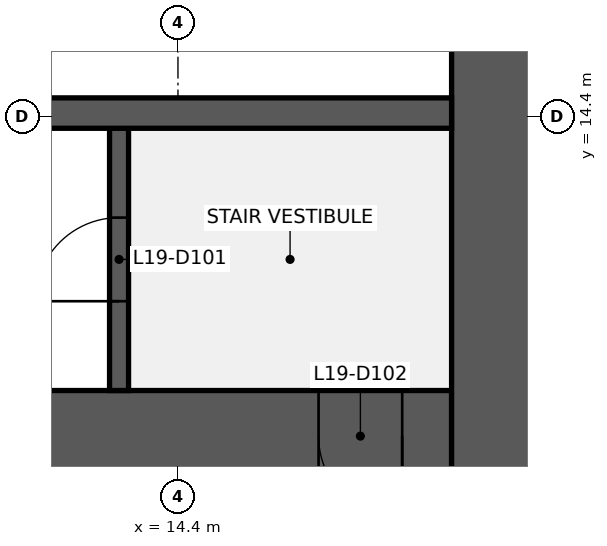
"""IFC4 building model, lengths in metres.
Left out: names, types, materials, properties, quantities, classifications, styles, units other than length and angle.
Written with IfcOpenShell. Run it as: python <this file> out.ifc"""

import sys

from ifc_helpers import new_model, si_unit, direction, frame, frame_2d, origin, place, context, subcontext, project, spatial, rectangle, extrude, element, fill, save


model = new_model("IFC4")
c1 = context("Model", 3, precision=1e-05, world=origin(), true_north=direction((0.0, 1.0)))
c2 = subcontext(c1, "Body", "Model", "MODEL_VIEW")
j1 = project(units=[si_unit("LENGTHUNIT", "METRE"), si_unit("PLANEANGLEUNIT", "RADIAN")], contexts=[c1])
p1 = place(None, origin())
s1 = spatial("IfcSite", under=j1, at=p1, CompositionType="ELEMENT")
p2 = place(p1, origin())
s2 = spatial("IfcBuilding", under=s1, at=p2, CompositionType="ELEMENT")
p3 = place(p2, frame((0.0, 0.0, 87.0)))
s3 = spatial("IfcBuildingStorey", under=s2, at=p3, CompositionType="ELEMENT", Elevation=87.0)
p4 = place(p3, frame((18.0, 10.2, 0.0), z_axis=(0.0, 0.0, 1.0), x_axis=(-1.0, 0.0, 0.0)))
e1 = element("IfcWall", 1, at=p4, inside=s3, PredefinedType="SHEAR", context=c2, shape_type="SweptSolid", body=[
    extrude(rectangle(XDim=8.4, YDim=1.2, at=frame_2d((4.2, 0.0))), origin(), (0.0, 0.0, 1.0), 4.1),
])
p5 = place(p4, frame((0.65, 0.0, 0.0)))
e2 = element("IfcOpeningElement", 2, at=p5, cuts=e1, PredefinedType="OPENING", context=c2, shape_type="SweptSolid", body=[
    extrude(rectangle(XDim=1.1, YDim=2.1, at=frame_2d((0.55, 1.05))), frame((0.0, 0.61, 0.0), z_axis=(0.0, -1.0, 0.0), x_axis=(1.0, 0.0, 0.0)), (0.0, 0.0, 1.0), 1.22),
])
p6 = place(p3, frame((18.6, 38.4, 0.0), z_axis=(0.0, 0.0, 1.0), x_axis=(0.0, -1.0, 0.0)))
e3 = element("IfcWall", 3, at=p6, inside=s3, PredefinedType="SHEAR", context=c2, shape_type="SweptSolid", body=[
    extrude(rectangle(XDim=28.8, YDim=1.2, at=frame_2d((14.4, 0.0))), origin(), (0.0, 0.0, 1.0), 4.1),
])
p7 = place(p6, frame((18.3, 0.0, 0.0)))
e4 = element("IfcOpeningElement", 4, at=p7, cuts=e3, PredefinedType="OPENING", context=c2, shape_type="SweptSolid", body=[
    extrude(rectangle(XDim=1.8, YDim=2.1, at=frame_2d((0.9, 1.05))), frame((0.0, 0.61, 0.0), z_axis=(0.0, -1.0, 0.0), x_axis=(1.0, 0.0, 0.0)), (0.0, 0.0, 1.0), 1.22),
])
p8 = place(p6, frame((8.7, 0.0, 0.0)))
e5 = element("IfcOpeningElement", 5, at=p8, cuts=e3, PredefinedType="OPENING", context=c2, shape_type="SweptSolid", body=[
    extrude(rectangle(XDim=1.8, YDim=2.1, at=frame_2d((0.9, 1.05))), frame((0.0, 0.61, 0.0), z_axis=(0.0, -1.0, 0.0), x_axis=(1.0, 0.0, 0.0)), (0.0, 0.0, 1.0), 1.22),
])
p9 = place(p3, frame((13.625, 10.8, 0.0), z_axis=(0.0, 0.0, 1.0), x_axis=(0.0, 1.0, 0.0)))
e6 = element("IfcWall", 6, at=p9, inside=s3, PredefinedType="SHEAR", context=c2, shape_type="SweptSolid", body=[
    extrude(rectangle(XDim=3.45, YDim=0.25, at=frame_2d((1.725, 0.0))), origin(), (0.0, 0.0, 1.0), 4.1),
])
p10 = place(p9, frame((1.175, 0.0, 0.0)))
e7 = element("IfcOpeningElement", 7, at=p10, cuts=e6, PredefinedType="OPENING", context=c2, shape_type="SweptSolid", body=[
    extrude(rectangle(XDim=1.1, YDim=2.1, at=frame_2d((0.55, 1.05))), frame((0.0, 0.135, 0.0), z_axis=(0.0, -1.0, 0.0), x_axis=(1.0, 0.0, 0.0)), (0.0, 0.0, 1.0), 0.27),
])
p11 = place(p3, frame((1.2, 14.45, 0.0), z_axis=(0.0, 0.0, 1.0), x_axis=(1.0, 0.0, 0.0)))
e8 = element("IfcWall", 8, at=p11, inside=s3, PredefinedType="SHEAR", context=c2, shape_type="SweptSolid", body=[
    extrude(rectangle(XDim=16.8, YDim=0.4, at=frame_2d((8.4, 0.0))), origin(), (0.0, 0.0, 1.0), 4.1),
])
p12 = place(p10, origin())
e9 = element("IfcDoor", 9, at=p12, inside=s3, OperationType="SINGLE_SWING_LEFT", PredefinedType="DOOR", context=c2, shape_type="SweptSolid", body=[
    extrude(rectangle(XDim=1.1, YDim=2.1, at=frame_2d((0.55, 1.05))), frame((0.0, 0.025, 0.0), z_axis=(0.0, -1.0, 0.0), x_axis=(1.0, 0.0, 0.0)), (0.0, 0.0, 1.0), 0.05),
])
fill(e7, e9)
p13 = place(p5, origin())
e10 = element("IfcDoor", 10, at=p13, inside=s3, OperationType="SINGLE_SWING_LEFT", PredefinedType="DOOR", context=c2, shape_type="SweptSolid", body=[
    extrude(rectangle(XDim=1.1, YDim=2.1, at=frame_2d((0.55, 1.05))), frame((0.0, 0.025, 0.0), z_axis=(0.0, -1.0, 0.0), x_axis=(1.0, 0.0, 0.0)), (0.0, 0.0, 1.0), 0.05),
])
fill(e2, e10)
save(model, sys.argv[1])
